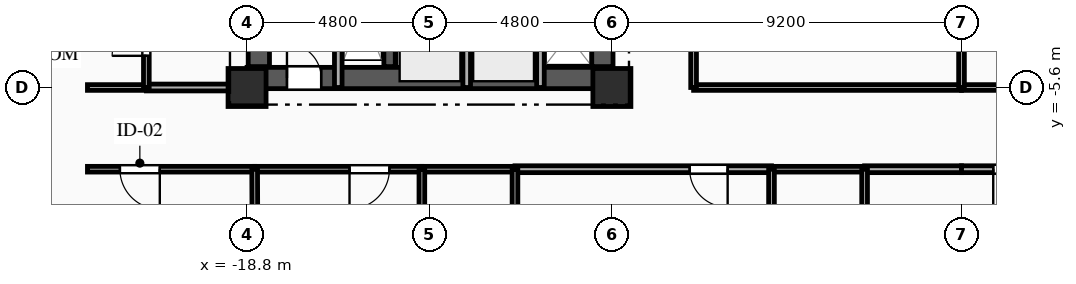
"""IFC4 building model, lengths in metres.
Left out: names, types, materials, properties, quantities, classifications, styles, units other than length and angle.
Written with IfcOpenShell. Run it as: python <this file> out.ifc"""

import sys

from ifc_helpers import new_model, si_unit, direction, frame, frame_2d, origin, origin_2d, place, context, subcontext, project, spatial, rectangle, extrude, element, fill, save


model = new_model("IFC4")
c1 = context("Model", 3, precision=1e-05, world=origin(), true_north=direction((0.0, 1.0)))
c2 = subcontext(c1, "Body", "Model", "MODEL_VIEW")
j1 = project(units=[si_unit("LENGTHUNIT", "METRE"), si_unit("PLANEANGLEUNIT", "RADIAN")], contexts=[c1])
p1 = place(None, origin())
s1 = spatial("IfcSite", under=j1, at=p1, CompositionType="ELEMENT")
p2 = place(p1, origin())
s2 = spatial("IfcBuilding", under=s1, at=p2, CompositionType="ELEMENT")
p3 = place(p2, frame((0.0, 0.0, 82.35)))
s3 = spatial("IfcBuildingStorey", under=s2, at=p3, CompositionType="ELEMENT", Elevation=82.35)
for number, where, z_axis, x_axis in (
    (1, (-18.8, -5.6, 0.0), (0.0, 0.0, 1.0), (1.0, 0.0, 0.0)),
    (2, (-9.2, -5.6, 0.0), (0.0, 0.0, 1.0), (1.0, 0.0, 0.0)),
):
    element("IfcColumn", number, at=place(p3, frame(where, z_axis=z_axis, x_axis=x_axis)), inside=s3, PredefinedType="COLUMN", context=c2, shape_type="SweptSolid", body=[
        extrude(rectangle(XDim=1.0, YDim=1.0, at=origin_2d()), origin(), (0.0, 0.0, 1.0), 3.35),
    ])
p4 = place(p3, frame((-18.8, -5.35, 0.0), z_axis=(0.0, 0.0, 1.0), x_axis=(1.0, 0.0, 0.0)))
e3 = element("IfcWall", 3, at=p4, inside=s3, PredefinedType="SHEAR", context=c2, shape_type="SweptSolid", body=[
    extrude(rectangle(XDim=9.6, YDim=0.56, at=frame_2d((4.8, 0.0))), origin(), (0.0, 0.0, 1.0), 3.045),
])
p5 = place(p4, frame((1.05, 0.0, 0.0)))
e4 = element("IfcOpeningElement", 4, at=p5, cuts=e3, PredefinedType="OPENING", context=c2, shape_type="SweptSolid", body=[
    extrude(rectangle(XDim=0.9, YDim=2.1, at=frame_2d((0.45, 1.05))), frame((0.0, 0.29, 0.0), z_axis=(0.0, -1.0, 0.0), x_axis=(1.0, 0.0, 0.0)), (0.0, 0.0, 1.0), 0.58),
])
p6 = place(p3, frame((-18.49, -5.05, 0.0), z_axis=(0.0, 0.0, 1.0), x_axis=(0.0, 1.0, 0.0)))
e5 = element("IfcWall", 5, at=p6, inside=s3, PredefinedType="SHEAR", context=c2, shape_type="SweptSolid", body=[
    extrude(rectangle(XDim=10.1, YDim=0.56, at=frame_2d((5.05, 0.0))), origin(), (0.0, 0.0, 1.0), 3.045),
])
p7 = place(p3, frame((-9.45, -5.05, 0.0), z_axis=(0.0, 0.0, 1.0), x_axis=(0.0, 1.0, 0.0)))
e6 = element("IfcWall", 6, at=p7, inside=s3, PredefinedType="SHEAR", context=c2, shape_type="SweptSolid", body=[
    extrude(rectangle(XDim=10.1, YDim=0.56, at=frame_2d((5.05, 0.0))), origin(), (0.0, 0.0, 1.0), 3.045),
])
p8 = place(p7, frame((7.175, 0.0, 0.0)))
e7 = element("IfcOpeningElement", 7, at=p8, cuts=e6, PredefinedType="OPENING", context=c2, shape_type="SweptSolid", body=[
    extrude(rectangle(XDim=0.9, YDim=2.1, at=frame_2d((0.45, 1.05))), frame((0.0, 0.29, 0.0), z_axis=(0.0, -1.0, 0.0), x_axis=(1.0, 0.0, 0.0)), (0.0, 0.0, 1.0), 0.58),
])
p9 = place(p7, frame((2.4, 0.0, 0.0)))
e8 = element("IfcOpeningElement", 8, at=p9, cuts=e6, PredefinedType="OPENING", context=c2, shape_type="SweptSolid", body=[
    extrude(rectangle(XDim=1.2, YDim=2.15, at=frame_2d((0.6, 1.075))), frame((0.0, 0.29, 0.0), z_axis=(0.0, -1.0, 0.0), x_axis=(1.0, 0.0, 0.0)), (0.0, 0.0, 1.0), 0.58),
])
p10 = place(p3, frame((-15.05, -5.05, 0.0), z_axis=(0.0, 0.0, 1.0), x_axis=(0.0, 1.0, 0.0)))
e9 = element("IfcWall", 9, at=p10, inside=s3, PredefinedType="SHEAR", context=c2, shape_type="SweptSolid", body=[
    extrude(rectangle(XDim=10.1, YDim=0.3, at=frame_2d((5.05, 0.0))), origin(), (0.0, 0.0, 1.0), 3.045),
])
p11 = place(p3, frame((-16.4, -5.6, 0.0), z_axis=(0.0, 0.0, 1.0), x_axis=(0.0, 1.0, 0.0)))
e10 = element("IfcWall", 10, at=p11, inside=s3, PredefinedType="PARTITIONING", context=c2, shape_type="SweptSolid", body=[
    extrude(rectangle(XDim=3.49, YDim=0.2, at=frame_2d((1.745, 0.0))), origin(), (0.0, 0.0, 1.0), 3.045),
])
for number, where, z_axis, x_axis in (
    (11, (-13.02, -5.6, 0.0), (0.0, 0.0, 1.0), (0.0, 1.0, 0.0)),
    (12, (-11.08, -5.6, 0.0), (0.0, 0.0, 1.0), (0.0, 1.0, 0.0)),
):
    element("IfcWall", number, at=place(p3, frame(where, z_axis=z_axis, x_axis=x_axis)), inside=s3, PredefinedType="PARTITIONING", context=c2, shape_type="SweptSolid", body=[
        extrude(rectangle(XDim=2.25, YDim=0.2, at=frame_2d((1.125, 0.0))), origin(), (0.0, 0.0, 1.0), 3.045),
    ])
p12 = place(p3, frame((-21.45, -5.6, 0.0), z_axis=(0.0, 0.0, 1.0), x_axis=(1.0, 0.0, 0.0)))
e13 = element("IfcWall", 13, at=p12, inside=s3, PredefinedType="PARTITIONING", context=c2, shape_type="SweptSolid", body=[
    extrude(rectangle(XDim=2.65, YDim=0.18, at=frame_2d((1.325, 0.0))), origin(), (0.0, 0.0, 1.0), 3.045),
])
p13 = place(p3, frame((-23.0, -5.6, 0.0), z_axis=(0.0, 0.0, 1.0), x_axis=(1.0, 0.0, 0.0)))
e14 = element("IfcWall", 14, at=p13, inside=s3, PredefinedType="PLUMBINGWALL", context=c2, shape_type="SweptSolid", body=[
    extrude(rectangle(XDim=1.55, YDim=0.15, at=frame_2d((0.775, 0.0))), origin(), (0.0, 0.0, 1.0), 3.045),
])
p14 = place(p3, frame((-18.6, -7.75, 0.0), z_axis=(0.0, 0.0, 1.0), x_axis=(-1.0, 0.0, 0.0)))
e15 = element("IfcWall", 15, at=p14, inside=s3, PredefinedType="PARTITIONING", context=c2, shape_type="SweptSolid", body=[
    extrude(rectangle(XDim=4.4, YDim=0.15, at=frame_2d((2.2, 0.0))), origin(), (0.0, 0.0, 1.0), 3.045),
])
p15 = place(p14, frame((2.496, 0.0, 0.0)))
e16 = element("IfcOpeningElement", 16, at=p15, cuts=e15, PredefinedType="OPENING", context=c2, shape_type="SweptSolid", body=[
    extrude(rectangle(XDim=1.05, YDim=2.15, at=frame_2d((0.525, 1.075))), frame((0.0, 0.085, 0.0), z_axis=(0.0, -1.0, 0.0), x_axis=(1.0, 0.0, 0.0)), (0.0, 0.0, 1.0), 0.17),
])
p16 = place(p3, frame((-14.2, -7.75, 0.0), z_axis=(0.0, 0.0, 1.0), x_axis=(-1.0, 0.0, 0.0)))
e17 = element("IfcWall", 17, at=p16, inside=s3, PredefinedType="PARTITIONING", context=c2, shape_type="SweptSolid", body=[
    extrude(rectangle(XDim=4.4, YDim=0.15, at=frame_2d((2.2, 0.0))), origin(), (0.0, 0.0, 1.0), 3.045),
])
p17 = place(p16, frame((0.854, 0.0, 0.0)))
e18 = element("IfcOpeningElement", 18, at=p17, cuts=e17, PredefinedType="OPENING", context=c2, shape_type="SweptSolid", body=[
    extrude(rectangle(XDim=1.05, YDim=2.15, at=frame_2d((0.525, 1.075))), frame((0.0, 0.085, 0.0), z_axis=(0.0, -1.0, 0.0), x_axis=(1.0, 0.0, 0.0)), (0.0, 0.0, 1.0), 0.17),
])
p18 = place(p3, frame((-5.0, -7.75, 0.0), z_axis=(0.0, 0.0, 1.0), x_axis=(-1.0, 0.0, 0.0)))
e19 = element("IfcWall", 19, at=p18, inside=s3, PredefinedType="PARTITIONING", context=c2, shape_type="SweptSolid", body=[
    extrude(rectangle(XDim=6.75, YDim=0.18, at=frame_2d((3.375, 0.0))), origin(), (0.0, 0.0, 1.0), 3.045),
])
p19 = place(p18, frame((1.154, 0.0, 0.0)))
e20 = element("IfcOpeningElement", 20, at=p19, cuts=e19, PredefinedType="OPENING", context=c2, shape_type="SweptSolid", body=[
    extrude(rectangle(XDim=1.0, YDim=2.15, at=frame_2d((0.5, 1.075))), frame((0.0, 0.1, 0.0), z_axis=(0.0, -1.0, 0.0), x_axis=(1.0, 0.0, 0.0)), (0.0, 0.0, 1.0), 0.2),
])
p20 = place(p3, frame((-11.75, -7.75, 0.0), z_axis=(0.0, 0.0, 1.0), x_axis=(-1.0, 0.0, 0.0)))
e21 = element("IfcWall", 21, at=p20, inside=s3, PredefinedType="PLUMBINGWALL", context=c2, shape_type="SweptSolid", body=[
    extrude(rectangle(XDim=2.45, YDim=0.15, at=frame_2d((1.225, 0.0))), origin(), (0.0, 0.0, 1.0), 3.045),
])
p21 = place(p3, frame((0.0, -7.75, 0.0), z_axis=(0.0, 0.0, 1.0), x_axis=(-1.0, 0.0, 0.0)))
e22 = element("IfcWall", 22, at=p21, inside=s3, PredefinedType="PARTITIONING", context=c2, shape_type="SweptSolid", body=[
    extrude(rectangle(XDim=2.55, YDim=0.18, at=frame_2d((1.275, 0.0))), origin(), (0.0, 0.0, 1.0), 3.045),
])
p22 = place(p3, frame((-2.55, -7.75, 0.0), z_axis=(0.0, 0.0, 1.0), x_axis=(-1.0, 0.0, 0.0)))
e23 = element("IfcWall", 23, at=p22, inside=s3, PredefinedType="PLUMBINGWALL", context=c2, shape_type="SweptSolid", body=[
    extrude(rectangle(XDim=2.45, YDim=0.15, at=frame_2d((1.225, 0.0))), origin(), (0.0, 0.0, 1.0), 3.045),
])
p23 = place(p3, frame((-7.05, -5.6, 0.0), z_axis=(0.0, 0.0, 1.0), x_axis=(1.0, 0.0, 0.0)))
e24 = element("IfcWall", 24, at=p23, inside=s3, PredefinedType="PARTITIONING", context=c2, shape_type="SweptSolid", body=[
    extrude(rectangle(XDim=7.05, YDim=0.15, at=frame_2d((3.525, 0.0))), origin(), (0.0, 0.0, 1.0), 2.53),
])
p24 = place(p3, frame((4.2, -7.75, 0.0), z_axis=(0.0, 0.0, 1.0), x_axis=(-1.0, 0.0, 0.0)))
e25 = element("IfcWall", 25, at=p24, inside=s3, PredefinedType="PARTITIONING", context=c2, shape_type="SweptSolid", body=[
    extrude(rectangle(XDim=4.2, YDim=0.18, at=frame_2d((2.1, 0.0))), origin(), (0.0, 0.0, 1.0), 3.045),
])
p25 = place(p24, frame((2.365, 0.0, 0.0)))
e26 = element("IfcOpeningElement", 26, at=p25, cuts=e25, PredefinedType="OPENING", context=c2, shape_type="SweptSolid", body=[
    extrude(rectangle(XDim=1.0, YDim=2.15, at=frame_2d((0.5, 1.075))), frame((0.0, 0.1, 0.0), z_axis=(0.0, -1.0, 0.0), x_axis=(1.0, 0.0, 0.0)), (0.0, 0.0, 1.0), 0.2),
])
p26 = place(p3, frame((0.0, -5.6, 0.0), z_axis=(0.0, 0.0, 1.0), x_axis=(1.0, 0.0, 0.0)))
e27 = element("IfcWall", 27, at=p26, inside=s3, PredefinedType="PARTITIONING", context=c2, shape_type="SweptSolid", body=[
    extrude(rectangle(XDim=7.05, YDim=0.15, at=frame_2d((3.525, 0.0))), origin(), (0.0, 0.0, 1.0), 2.53),
])
p27 = place(p26, frame((1.185, 0.0, 0.0)))
e28 = element("IfcOpeningElement", 28, at=p27, cuts=e27, PredefinedType="OPENING", context=c2, shape_type="SweptSolid", body=[
    extrude(rectangle(XDim=1.05, YDim=2.15, at=frame_2d((0.525, 1.075))), frame((0.0, 0.085, 0.0), z_axis=(0.0, -1.0, 0.0), x_axis=(1.0, 0.0, 0.0)), (0.0, 0.0, 1.0), 0.17),
])
p28 = place(p3, frame((-7.05, 8.5, 0.0), z_axis=(0.0, 0.0, 1.0), x_axis=(0.0, -1.0, 0.0)))
e29 = element("IfcWall", 29, at=p28, inside=s3, PredefinedType="PARTITIONING", context=c2, shape_type="SweptSolid", body=[
    extrude(rectangle(XDim=14.1, YDim=0.15, at=frame_2d((7.05, 0.0))), origin(), (0.0, 0.0, 1.0), 3.045),
])
p29 = place(p28, frame((8.011, 0.0, 0.0)))
e30 = element("IfcOpeningElement", 30, at=p29, cuts=e29, PredefinedType="OPENING", context=c2, shape_type="SweptSolid", body=[
    extrude(rectangle(XDim=1.05, YDim=2.15, at=frame_2d((0.525, 1.075))), frame((0.0, 0.085, 0.0), z_axis=(0.0, -1.0, 0.0), x_axis=(1.0, 0.0, 0.0)), (0.0, 0.0, 1.0), 0.17),
])
p30 = place(p3, frame((-21.45, -5.6, 0.0), z_axis=(0.0, 0.0, 1.0), x_axis=(0.0, 1.0, 0.0)))
e31 = element("IfcWall", 31, at=p30, inside=s3, PredefinedType="PLUMBINGWALL", context=c2, shape_type="SweptSolid", body=[
    extrude(rectangle(XDim=2.35, YDim=0.15, at=frame_2d((1.175, 0.0))), origin(), (0.0, 0.0, 1.0), 3.045),
])
p31 = place(p30, frame((0.834, 0.0, 0.0)))
e32 = element("IfcOpeningElement", 32, at=p31, cuts=e31, PredefinedType="OPENING", context=c2, shape_type="SweptSolid", body=[
    extrude(rectangle(XDim=0.9, YDim=2.1, at=frame_2d((0.45, 1.05))), frame((0.0, 0.085, 0.0), z_axis=(0.0, -1.0, 0.0), x_axis=(1.0, 0.0, 0.0)), (0.0, 0.0, 1.0), 0.17),
])
p32 = place(p3, frame((-18.6, -7.75, 0.0), z_axis=(0.0, 0.0, 1.0), x_axis=(0.003864456523, -0.99999253296, 0.0)))
e33 = element("IfcWall", 33, at=p32, inside=s3, PredefinedType="PARTITIONING", context=c2, shape_type="SweptSolid", body=[
    extrude(rectangle(XDim=11.372, YDim=0.15, at=frame_2d((5.686, 0.0))), origin(), (0.0, 0.0, 1.0), 3.045),
])
for number, where, z_axis, x_axis in (
    (34, (-14.2, -7.75, 0.0), (0.0, 0.0, 1.0), (0.0, -1.0, 0.0)),
    (35, (-11.75, -9.9, 0.0), (0.0, 0.0, 1.0), (0.0, 1.0, 0.0)),
    (36, (-5.0, -7.75, 0.0), (0.0, 0.0, 1.0), (0.0, -1.0, 0.0)),
    (37, (-2.55, -9.9, 0.0), (0.0, 0.0, 1.0), (0.0, 1.0, 0.0)),
):
    element("IfcWall", number, at=place(p3, frame(where, z_axis=z_axis, x_axis=x_axis)), inside=s3, PredefinedType="PLUMBINGWALL", context=c2, shape_type="SweptSolid", body=[
        extrude(rectangle(XDim=2.15, YDim=0.15, at=frame_2d((1.075, 0.0))), origin(), (0.0, 0.0, 1.0), 3.045),
    ])
p33 = place(p3, frame((0.0, 1.45, 0.0), z_axis=(0.0, 0.0, 1.0), x_axis=(0.0, -1.0, 0.0)))
e38 = element("IfcWall", 38, at=p33, inside=s3, PredefinedType="PARTITIONING", context=c2, shape_type="SweptSolid", body=[
    extrude(rectangle(XDim=7.05, YDim=0.15, at=frame_2d((3.525, 0.0))), origin(), (0.0, 0.0, 1.0), 3.045),
])
p34 = place(p5, origin())
e39 = element("IfcDoor", 39, at=p34, inside=s3, OperationType="SINGLE_SWING_LEFT", PredefinedType="DOOR", context=c2, shape_type="SweptSolid", body=[
    extrude(rectangle(XDim=0.9, YDim=2.1, at=frame_2d((0.45, 1.05))), frame((0.0, 0.025, 0.0), z_axis=(0.0, -1.0, 0.0), x_axis=(1.0, 0.0, 0.0)), (0.0, 0.0, 1.0), 0.05),
])
fill(e4, e39)
p35 = place(p15, origin())
e40 = element("IfcDoor", 40, at=p35, inside=s3, OperationType="SINGLE_SWING_LEFT", PredefinedType="DOOR", context=c2, shape_type="SweptSolid", body=[
    extrude(rectangle(XDim=1.05, YDim=2.15, at=frame_2d((0.525, 1.075))), frame((0.0, 0.025, 0.0), z_axis=(0.0, -1.0, 0.0), x_axis=(1.0, 0.0, 0.0)), (0.0, 0.0, 1.0), 0.05),
])
fill(e16, e40)
p36 = place(p17, origin())
e41 = element("IfcDoor", 41, at=p36, inside=s3, OperationType="SINGLE_SWING_RIGHT", PredefinedType="DOOR", context=c2, shape_type="SweptSolid", body=[
    extrude(rectangle(XDim=1.05, YDim=2.15, at=frame_2d((0.525, 1.075))), frame((0.0, 0.025, 0.0), z_axis=(0.0, -1.0, 0.0), x_axis=(1.0, 0.0, 0.0)), (0.0, 0.0, 1.0), 0.05),
])
fill(e18, e41)
p37 = place(p19, origin())
e42 = element("IfcDoor", 42, at=p37, inside=s3, OperationType="SINGLE_SWING_LEFT", PredefinedType="DOOR", context=c2, shape_type="SweptSolid", body=[
    extrude(rectangle(XDim=1.0, YDim=2.15, at=frame_2d((0.5, 1.075))), frame((0.0, 0.025, 0.0), z_axis=(0.0, -1.0, 0.0), x_axis=(1.0, 0.0, 0.0)), (0.0, 0.0, 1.0), 0.05),
])
fill(e20, e42)
p38 = place(p25, origin())
e43 = element("IfcDoor", 43, at=p38, inside=s3, OperationType="SINGLE_SWING_RIGHT", PredefinedType="DOOR", context=c2, shape_type="SweptSolid", body=[
    extrude(rectangle(XDim=1.0, YDim=2.15, at=frame_2d((0.5, 1.075))), frame((0.0, 0.025, 0.0), z_axis=(0.0, -1.0, 0.0), x_axis=(1.0, 0.0, 0.0)), (0.0, 0.0, 1.0), 0.05),
])
fill(e26, e43)
p39 = place(p31, origin())
e44 = element("IfcDoor", 44, at=p39, inside=s3, OperationType="SINGLE_SWING_LEFT", PredefinedType="DOOR", context=c2, shape_type="SweptSolid", body=[
    extrude(rectangle(XDim=0.9, YDim=2.1, at=frame_2d((0.45, 1.05))), frame((0.0, 0.025, 0.0), z_axis=(0.0, -1.0, 0.0), x_axis=(1.0, 0.0, 0.0)), (0.0, 0.0, 1.0), 0.05),
])
fill(e32, e44)
save(model, sys.argv[1])
